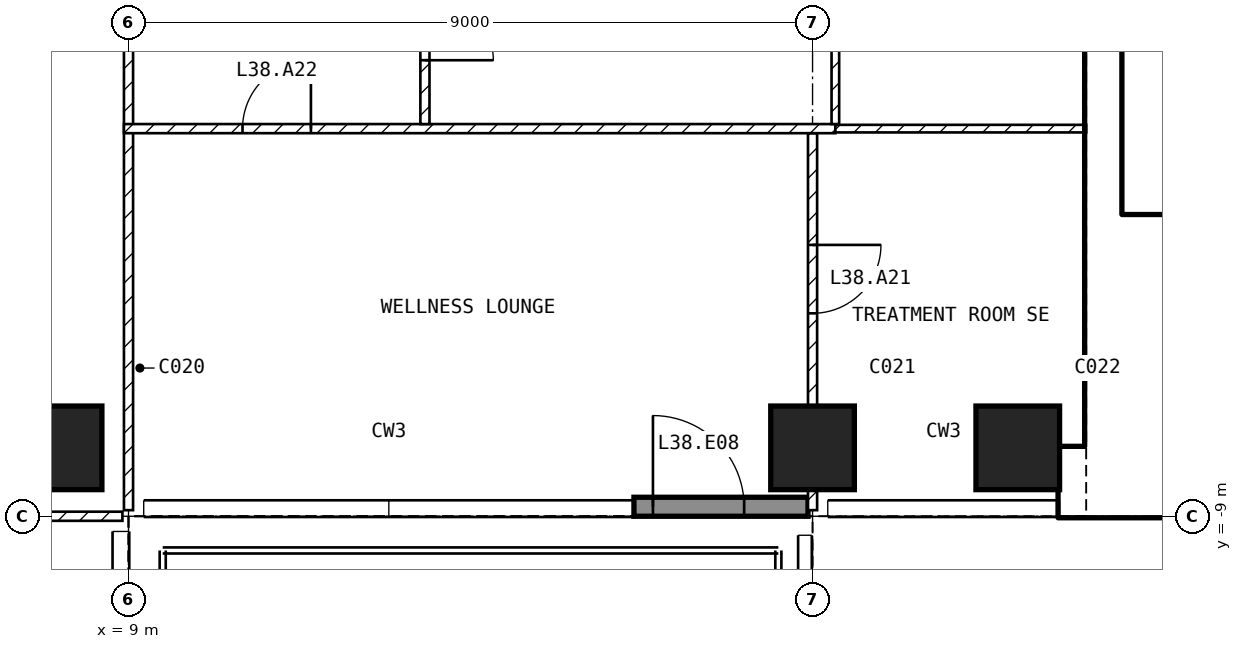
"""IFC4 building model, lengths in metres.
Left out: names, types, materials, properties, quantities, classifications, styles, units other than length and angle.
Written with IfcOpenShell. Run it as: python <this file> out.ifc"""

import sys

from ifc_helpers import new_model, si_unit, direction, frame, frame_2d, origin, origin_2d, place, context, subcontext, project, spatial, rectangle, extrude, element, fill, save


model = new_model("IFC4")
c1 = context("Model", 3, precision=1e-05, world=origin(), true_north=direction((0.0, 1.0)))
c2 = subcontext(c1, "Body", "Model", "MODEL_VIEW")
j1 = project(units=[si_unit("LENGTHUNIT", "METRE"), si_unit("PLANEANGLEUNIT", "RADIAN")], contexts=[c1])
p1 = place(None, origin())
s1 = spatial("IfcSite", under=j1, at=p1, CompositionType="ELEMENT")
p2 = place(p1, origin())
s2 = spatial("IfcBuilding", under=s1, at=p2, CompositionType="ELEMENT")
p3 = place(p2, frame((0.0, 0.0, 154.9)))
s3 = spatial("IfcBuildingStorey", under=s2, at=p3, CompositionType="ELEMENT", Elevation=154.9)
for number, where, z_axis, x_axis in (
    (1, (8.1, -8.1, -0.3), (0.0, 0.0, 1.0), (1.0, 0.0, 0.0)),
    (2, (18.0, -8.1, -0.3), (0.0, 0.0, 1.0), (1.0, 0.0, 0.0)),
    (3, (20.7, -8.1, -0.3), (0.0, 0.0, 1.0), (1.0, 0.0, 0.0)),
):
    element("IfcColumn", number, at=place(p3, frame(where, z_axis=z_axis, x_axis=x_axis)), inside=s3, PredefinedType="COLUMN", context=c2, shape_type="SweptSolid", body=[
        extrude(rectangle(XDim=1.1, YDim=1.1, at=origin_2d()), origin(), (0.0, 0.0, 1.0), 7.05),
    ])
p4 = place(p3, frame((15.65, -8.875, 0.0), z_axis=(0.0, 0.0, 1.0), x_axis=(1.0, 0.0, 0.0)))
e4 = element("IfcWall", 4, at=p4, inside=s3, PredefinedType="SOLIDWALL", context=c2, shape_type="SweptSolid", body=[
    extrude(rectangle(XDim=2.29, YDim=0.25, at=frame_2d((1.145, 0.0))), origin(), (0.0, 0.0, 1.0), 6.75),
])
p5 = place(p4, frame((0.25, 0.0, 0.0)))
e5 = element("IfcOpeningElement", 5, at=p5, cuts=e4, PredefinedType="OPENING", context=c2, shape_type="SweptSolid", body=[
    extrude(rectangle(XDim=1.2, YDim=2.4, at=frame_2d((0.6, 1.2))), frame((0.0, 0.135, 0.0), z_axis=(0.0, -1.0, 0.0), x_axis=(1.0, 0.0, 0.0)), (0.0, 0.0, 1.0), 0.27),
])
p6 = place(p3, frame((21.25, -8.55, 0.0), z_axis=(0.0, 0.0, 1.0), x_axis=(1.0, 0.0, 0.0)))
e6 = element("IfcWall", 6, at=p6, inside=s3, PredefinedType="SHEAR", context=c2, shape_type="SweptSolid", body=[
    extrude(rectangle(XDim=8.95, YDim=0.9, at=frame_2d((4.475, 0.0))), origin(), (0.0, 0.0, 1.0), 6.75),
])
p7 = place(p3, frame((21.825, -8.1, 0.0), z_axis=(0.0, 0.0, 1.0), x_axis=(0.0, 1.0, 0.0)))
e7 = element("IfcWall", 7, at=p7, inside=s3, PredefinedType="SHEAR", context=c2, shape_type="SweptSolid", body=[
    extrude(rectangle(XDim=6.9, YDim=0.45, at=frame_2d((3.45, 0.0))), origin(), (0.0, 0.0, 1.0), 6.75),
])
p8 = place(p3, frame((22.05, -5.15, 0.0), z_axis=(0.0, 0.0, 1.0), x_axis=(1.0, 0.0, 0.0)))
e8 = element("IfcWall", 8, at=p8, inside=s3, PredefinedType="SOLIDWALL", context=c2, shape_type="SweptSolid", body=[
    extrude(rectangle(XDim=6.3, YDim=0.2, at=frame_2d((3.15, 0.0))), origin(), (0.0, 0.0, 1.0), 6.75),
])
p9 = place(p8, frame((0.2, 0.0, 0.0)))
e9 = element("IfcOpeningElement", 9, at=p9, cuts=e8, PredefinedType="OPENING", context=c2, shape_type="SweptSolid", body=[
    extrude(rectangle(XDim=1.0, YDim=2.1, at=frame_2d((0.5, 1.05))), frame((0.0, 0.11, 0.0), z_axis=(0.0, -1.0, 0.0), x_axis=(1.0, 0.0, 0.0)), (0.0, 0.0, 1.0), 0.22),
])
p10 = place(p3, frame((9.0, -1.26, 0.0), z_axis=(0.0, 0.0, 1.0), x_axis=(0.0, -1.0, 0.0)))
e10 = element("IfcWall", 10, at=p10, inside=s3, PredefinedType="PARTITIONING", context=c2, shape_type="SweptSolid", body=[
    extrude(rectangle(XDim=7.66, YDim=0.12, at=frame_2d((3.83, 0.0))), origin(), (0.0, 0.0, 1.0), 6.75),
])
p11 = place(p3, frame((8.92, -9.0, 0.0), z_axis=(0.0, 0.0, 1.0), x_axis=(-1.0, 0.0, 0.0)))
e11 = element("IfcWall", 11, at=p11, inside=s3, PredefinedType="PARTITIONING", context=c2, shape_type="SweptSolid", body=[
    extrude(rectangle(XDim=4.42, YDim=0.12, at=frame_2d((2.21, 0.0))), origin(), (0.0, 0.0, 1.0), 6.75),
])
p12 = place(p3, frame((18.0, -3.96, 0.0), z_axis=(0.0, 0.0, 1.0), x_axis=(0.0, -1.0, 0.0)))
e12 = element("IfcWall", 12, at=p12, inside=s3, PredefinedType="PARTITIONING", context=c2, shape_type="SweptSolid", body=[
    extrude(rectangle(XDim=4.96, YDim=0.12, at=frame_2d((2.48, 0.0))), origin(), (0.0, 0.0, 1.0), 5.914),
])
p13 = place(p12, frame((1.47, 0.0, 0.0)))
e13 = element("IfcOpeningElement", 13, at=p13, cuts=e12, PredefinedType="OPENING", context=c2, shape_type="SweptSolid", body=[
    extrude(rectangle(XDim=0.9, YDim=2.1, at=frame_2d((0.45, 1.05))), frame((0.0, 0.07, 0.0), z_axis=(0.0, -1.0, 0.0), x_axis=(1.0, 0.0, 0.0)), (0.0, 0.0, 1.0), 0.14),
])
p14 = place(p3, frame((8.94, -3.9, 0.0), z_axis=(0.0, 0.0, 1.0), x_axis=(1.0, 0.0, 0.0)))
e14 = element("IfcWall", 14, at=p14, inside=s3, PredefinedType="PARTITIONING", context=c2, shape_type="SweptSolid", body=[
    extrude(rectangle(XDim=9.36, YDim=0.12, at=frame_2d((4.68, 0.0))), origin(), (0.0, 0.0, 1.0), 6.75),
])
p15 = place(p14, frame((1.56, 0.0, 0.0)))
e15 = element("IfcOpeningElement", 15, at=p15, cuts=e14, PredefinedType="OPENING", context=c2, shape_type="SweptSolid", body=[
    extrude(rectangle(XDim=0.9, YDim=2.1, at=frame_2d((0.45, 1.05))), frame((0.0, 0.07, 0.0), z_axis=(0.0, -1.0, 0.0), x_axis=(1.0, 0.0, 0.0)), (0.0, 0.0, 1.0), 0.14),
])
p16 = place(p3, frame((18.3, -3.9, 0.0), z_axis=(0.0, 0.0, 1.0), x_axis=(1.0, 0.0, 0.0)))
e16 = element("IfcWall", 16, at=p16, inside=s3, PredefinedType="PARTITIONING", context=c2, shape_type="SweptSolid", body=[
    extrude(rectangle(XDim=3.3, YDim=0.1, at=frame_2d((1.65, 0.0))), origin(), (0.0, 0.0, 1.0), 6.75),
])
p17 = place(p3, frame((12.9, -1.26, 0.0), z_axis=(0.0, 0.0, 1.0), x_axis=(0.0, -1.0, 0.0)))
e17 = element("IfcWall", 17, at=p17, inside=s3, PredefinedType="PARTITIONING", context=c2, shape_type="SweptSolid", body=[
    extrude(rectangle(XDim=2.58, YDim=0.12, at=frame_2d((1.29, 0.0))), origin(), (0.0, 0.0, 1.0), 6.217),
])
p18 = place(p17, frame((0.84, 0.0, 0.0)))
e18 = element("IfcOpeningElement", 18, at=p18, cuts=e17, PredefinedType="OPENING", context=c2, shape_type="SweptSolid", body=[
    extrude(rectangle(XDim=0.9, YDim=2.1, at=frame_2d((0.45, 1.05))), frame((0.0, 0.07, 0.0), z_axis=(0.0, -1.0, 0.0), x_axis=(1.0, 0.0, 0.0)), (0.0, 0.0, 1.0), 0.14),
])
p19 = place(p3, frame((18.3, -1.26, 0.0), z_axis=(0.0, 0.0, 1.0), x_axis=(0.0, -1.0, 0.0)))
e19 = element("IfcWall", 19, at=p19, inside=s3, PredefinedType="PARTITIONING", context=c2, shape_type="SweptSolid", body=[
    extrude(rectangle(XDim=2.58, YDim=0.1, at=frame_2d((1.29, 0.0))), origin(), (0.0, 0.0, 1.0), 6.75),
])
p20 = place(p5, origin())
e20 = element("IfcDoor", 20, at=p20, inside=s3, OperationType="SINGLE_SWING_LEFT", PredefinedType="DOOR", context=c2, shape_type="SweptSolid", body=[
    extrude(rectangle(XDim=1.2, YDim=2.4, at=frame_2d((0.6, 1.2))), frame((0.0, 0.025, 0.0), z_axis=(0.0, -1.0, 0.0), x_axis=(1.0, 0.0, 0.0)), (0.0, 0.0, 1.0), 0.05),
])
fill(e5, e20)
p21 = place(p9, origin())
e21 = element("IfcDoor", 21, at=p21, inside=s3, OperationType="SINGLE_SWING_LEFT", PredefinedType="DOOR", context=c2, shape_type="SweptSolid", body=[
    extrude(rectangle(XDim=1.0, YDim=2.1, at=frame_2d((0.5, 1.05))), frame((0.0, 0.025, 0.0), z_axis=(0.0, -1.0, 0.0), x_axis=(1.0, 0.0, 0.0)), (0.0, 0.0, 1.0), 0.05),
])
fill(e9, e21)
p22 = place(p18, origin())
e22 = element("IfcDoor", 22, at=p22, inside=s3, OperationType="SINGLE_SWING_RIGHT", PredefinedType="DOOR", context=c2, shape_type="SweptSolid", body=[
    extrude(rectangle(XDim=0.9, YDim=2.1, at=frame_2d((0.45, 1.05))), frame((0.0, 0.025, 0.0), z_axis=(0.0, -1.0, 0.0), x_axis=(1.0, 0.0, 0.0)), (0.0, 0.0, 1.0), 0.05),
])
fill(e18, e22)
p23 = place(p13, origin())
e23 = element("IfcDoor", 23, at=p23, inside=s3, OperationType="SINGLE_SWING_LEFT", PredefinedType="DOOR", context=c2, shape_type="SweptSolid", body=[
    extrude(rectangle(XDim=0.9, YDim=2.1, at=frame_2d((0.45, 1.05))), frame((0.0, 0.025, 0.0), z_axis=(0.0, -1.0, 0.0), x_axis=(1.0, 0.0, 0.0)), (0.0, 0.0, 1.0), 0.05),
])
fill(e13, e23)
p24 = place(p15, origin())
e24 = element("IfcDoor", 24, at=p24, inside=s3, OperationType="SINGLE_SWING_RIGHT", PredefinedType="DOOR", context=c2, shape_type="SweptSolid", body=[
    extrude(rectangle(XDim=0.9, YDim=2.1, at=frame_2d((0.45, 1.05))), frame((0.0, 0.025, 0.0), z_axis=(0.0, -1.0, 0.0), x_axis=(1.0, 0.0, 0.0)), (0.0, 0.0, 1.0), 0.05),
])
fill(e15, e24)
save(model, sys.argv[1])
